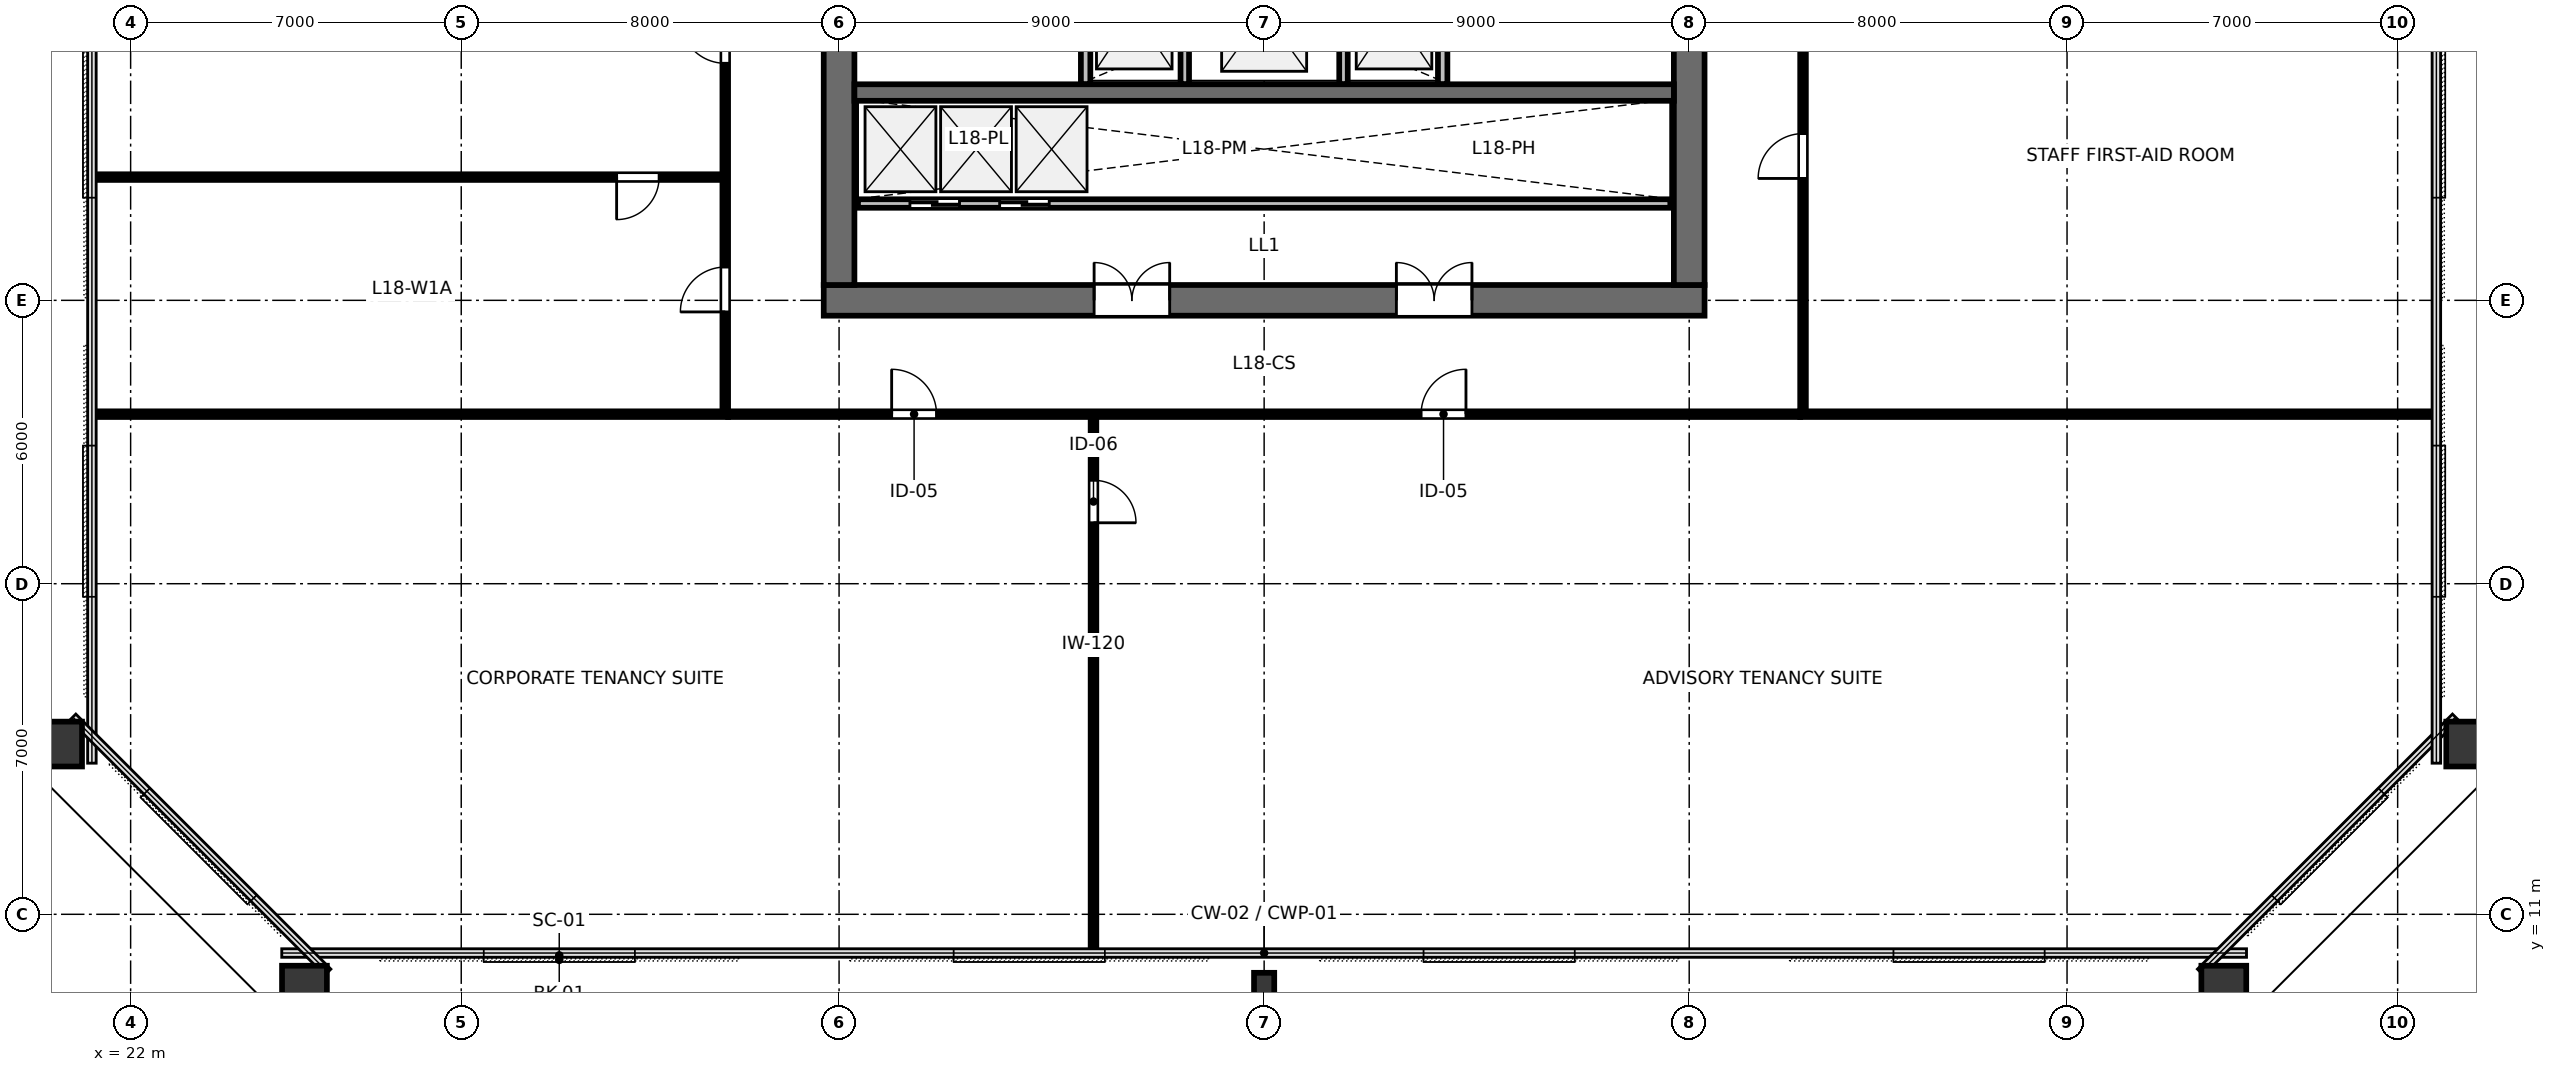
"""IFC4 building model, lengths in metres.
Left out: names, types, materials, properties, quantities, classifications, styles, units other than length and angle.
Written with IfcOpenShell. Run it as: python <this file> out.ifc"""

import sys

from ifc_helpers import new_model, si_unit, direction, frame, frame_2d, origin, origin_2d, place, context, subcontext, project, spatial, rectangle, hollow_rectangle, i_section, extrude, element, fill, save


model = new_model("IFC4")
c1 = context("Model", 3, precision=1e-05, world=origin(), true_north=direction((0.0, 1.0)))
c2 = subcontext(c1, "Body", "Model", "MODEL_VIEW")
j1 = project(units=[si_unit("LENGTHUNIT", "METRE"), si_unit("PLANEANGLEUNIT", "RADIAN")], contexts=[c1])
p1 = place(None, origin())
s1 = spatial("IfcSite", under=j1, at=p1, CompositionType="ELEMENT")
p2 = place(p1, origin())
s2 = spatial("IfcBuilding", under=s1, at=p2, CompositionType="ELEMENT")
p3 = place(p2, frame((0.0, 0.0, 71.2)))
s3 = spatial("IfcBuildingStorey", under=s2, at=p3, CompositionType="ELEMENT", Elevation=71.2)
p4 = place(p3, frame((36.675, 24.0, 0.0), z_axis=(0.0, 0.0, 1.0), x_axis=(1.0, 0.0, 0.0)))
e1 = element("IfcWall", 1, at=p4, inside=s3, PredefinedType="SHEAR", context=c2, shape_type="SweptSolid", body=[
    extrude(rectangle(XDim=18.65, YDim=0.65, at=frame_2d((9.325, 0.0))), origin(), (0.0, 0.0, 1.0), 3.36),
])
p5 = place(p4, frame((5.725, 0.0, 0.0)))
e2 = element("IfcOpeningElement", 2, at=p5, cuts=e1, PredefinedType="OPENING", context=c2, shape_type="SweptSolid", body=[
    extrude(rectangle(XDim=1.6, YDim=2.15, at=frame_2d((0.8, 1.075))), frame((0.0, 0.335, 0.0), z_axis=(0.0, -1.0, 0.0), x_axis=(1.0, 0.0, 0.0)), (0.0, 0.0, 1.0), 0.67),
])
p6 = place(p4, frame((12.125, 0.0, 0.0)))
e3 = element("IfcOpeningElement", 3, at=p6, cuts=e1, PredefinedType="OPENING", context=c2, shape_type="SweptSolid", body=[
    extrude(rectangle(XDim=1.6, YDim=2.15, at=frame_2d((0.8, 1.075))), frame((0.0, 0.335, 0.0), z_axis=(0.0, -1.0, 0.0), x_axis=(1.0, 0.0, 0.0)), (0.0, 0.0, 1.0), 0.67),
])
p7 = place(p3, frame((37.0, 24.325, 0.0), z_axis=(0.0, 0.0, 1.0), x_axis=(0.0, 1.0, 0.0)))
e4 = element("IfcWall", 4, at=p7, inside=s3, PredefinedType="SHEAR", context=c2, shape_type="SweptSolid", body=[
    extrude(rectangle(XDim=15.35, YDim=0.65, at=frame_2d((7.675, 0.0))), origin(), (0.0, 0.0, 1.0), 3.36),
])
p8 = place(p7, frame((5.2, 0.0, 0.0)))
e5 = element("IfcOpeningElement", 5, at=p8, cuts=e4, PredefinedType="OPENING", context=c2, shape_type="SweptSolid", body=[
    extrude(rectangle(XDim=1.15, YDim=2.15, at=frame_2d((0.575, 1.075))), frame((0.0, 0.335, 0.0), z_axis=(0.0, -1.0, 0.0), x_axis=(1.0, 0.0, 0.0)), (0.0, 0.0, 1.0), 0.67),
])
p9 = place(p3, frame((55.0, 24.325, 0.0), z_axis=(0.0, 0.0, 1.0), x_axis=(0.0, 1.0, 0.0)))
e6 = element("IfcWall", 6, at=p9, inside=s3, PredefinedType="SHEAR", context=c2, shape_type="SweptSolid", body=[
    extrude(rectangle(XDim=15.35, YDim=0.65, at=frame_2d((7.675, 0.0))), origin(), (0.0, 0.0, 1.0), 3.36),
])
p10 = place(p9, frame((5.2, 0.0, 0.0)))
e7 = element("IfcOpeningElement", 7, at=p10, cuts=e6, PredefinedType="OPENING", context=c2, shape_type="SweptSolid", body=[
    extrude(rectangle(XDim=1.15, YDim=2.15, at=frame_2d((0.575, 1.075))), frame((0.0, 0.335, 0.0), z_axis=(0.0, -1.0, 0.0), x_axis=(1.0, 0.0, 0.0)), (0.0, 0.0, 1.0), 0.67),
])
p11 = place(p3, frame((37.325, 28.4, 0.0), z_axis=(0.0, 0.0, 1.0), x_axis=(1.0, 0.0, 0.0)))
e8 = element("IfcWall", 8, at=p11, inside=s3, PredefinedType="SHEAR", context=c2, shape_type="SweptSolid", body=[
    extrude(rectangle(XDim=17.35, YDim=0.35, at=frame_2d((8.675, 0.0))), origin(), (0.0, 0.0, 1.0), 3.36),
])
p12 = place(p3, frame((25.681, 9.336, 0.0), z_axis=(0.0, 0.0, 1.0), x_axis=(1.0, 0.0, 0.0)))
e9 = element("IfcColumn", 9, at=p12, inside=s3, PredefinedType="COLUMN", context=c2, shape_type="SweptSolid", body=[
    extrude(hollow_rectangle(XDim=0.95, YDim=1.15, WallThickness=0.06, at=origin_2d()), origin(), (0.0, 0.0, 1.0), 3.358),
])
p13 = place(p3, frame((46.0, 9.52, 0.0), z_axis=(0.0, 0.0, 1.0), x_axis=(1.0, 0.0, 0.0)))
e10 = element("IfcColumn", 10, at=p13, inside=s3, PredefinedType="COLUMN", context=c2, shape_type="SweptSolid", body=[
    extrude(i_section(OverallWidth=0.428, OverallDepth=0.483, WebThickness=0.051, FlangeThickness=0.082, FilletRadius=0.025, at=origin_2d()), origin(), (0.0, 0.0, 1.0), 3.358),
])
for number, where, z_axis, x_axis in (
    (11, (66.319, 9.336, 0.0), (0.0, 0.0, 1.0), (1.0, 0.0, 0.0)),
    (12, (71.604, 14.604, 0.0), (0.0, 0.0, 1.0), (0.0, 1.0, 0.0)),
    (13, (20.396, 14.604, 0.0), (0.0, 0.0, 1.0), (0.0, 1.0, 0.0)),
):
    element("IfcColumn", number, at=place(p3, frame(where, z_axis=z_axis, x_axis=x_axis)), inside=s3, PredefinedType="COLUMN", context=c2, shape_type="SweptSolid", body=[
        extrude(hollow_rectangle(XDim=0.95, YDim=1.15, WallThickness=0.06, at=origin_2d()), origin(), (0.0, 0.0, 1.0), 3.358),
    ])
p14 = place(p3, frame((42.22, 28.58, 0.0), z_axis=(0.0, 0.0, 1.0), x_axis=(0.0, 1.0, 0.0)))
e14 = element("IfcWall", 14, at=p14, inside=s3, PredefinedType="PARTITIONING", context=c2, shape_type="SweptSolid", body=[
    extrude(rectangle(XDim=3.04, YDim=0.2, at=frame_2d((1.52, 0.0))), origin(), (0.0, 0.0, 1.0), 3.36),
])
p15 = place(p14, frame((0.95, 0.0, 0.0)))
e15 = element("IfcOpeningElement", 15, at=p15, cuts=e14, PredefinedType="OPENING", context=c2, shape_type="SweptSolid", body=[
    extrude(rectangle(XDim=1.05, YDim=2.15, at=frame_2d((0.525, 1.075))), frame((0.0, 0.11, 0.0), z_axis=(0.0, -1.0, 0.0), x_axis=(1.0, 0.0, 0.0)), (0.0, 0.0, 1.0), 0.22),
])
p16 = place(p3, frame((49.78, 28.58, 0.0), z_axis=(0.0, 0.0, 1.0), x_axis=(0.0, 1.0, 0.0)))
e16 = element("IfcWall", 16, at=p16, inside=s3, PredefinedType="PARTITIONING", context=c2, shape_type="SweptSolid", body=[
    extrude(rectangle(XDim=3.04, YDim=0.2, at=frame_2d((1.52, 0.0))), origin(), (0.0, 0.0, 1.0), 3.36),
])
p17 = place(p16, frame((0.95, 0.0, 0.0)))
e17 = element("IfcOpeningElement", 17, at=p17, cuts=e16, PredefinedType="OPENING", context=c2, shape_type="SweptSolid", body=[
    extrude(rectangle(XDim=1.05, YDim=2.15, at=frame_2d((0.525, 1.075))), frame((0.0, 0.11, 0.0), z_axis=(0.0, -1.0, 0.0), x_axis=(1.0, 0.0, 0.0)), (0.0, 0.0, 1.0), 0.22),
])
for number, where, z_axis, x_axis in (
    (18, (44.32, 28.58, 0.0), (0.0, 0.0, 1.0), (0.0, 1.0, 0.0)),
    (19, (47.68, 28.58, 0.0), (0.0, 0.0, 1.0), (0.0, 1.0, 0.0)),
):
    element("IfcWall", number, at=place(p3, frame(where, z_axis=z_axis, x_axis=x_axis)), inside=s3, PredefinedType="PARTITIONING", context=c2, shape_type="SweptSolid", body=[
        extrude(rectangle(XDim=3.04, YDim=0.18, at=frame_2d((1.52, 0.0))), origin(), (0.0, 0.0, 1.0), 3.36),
    ])
p18 = place(p3, frame((37.4, 26.05, 0.0), z_axis=(0.0, 0.0, 1.0), x_axis=(1.0, 0.0, 0.0)))
e20 = element("IfcWall", 20, at=p18, inside=s3, PredefinedType="PARTITIONING", context=c2, shape_type="SweptSolid", body=[
    extrude(rectangle(XDim=17.2, YDim=0.18, at=frame_2d((8.6, 0.0))), origin(), (0.0, 0.0, 1.0), 3.36),
])
p19 = place(p18, frame((1.1, 0.0, 0.0)))
e21 = element("IfcOpeningElement", 21, at=p19, cuts=e20, PredefinedType="OPENING", context=c2, shape_type="SweptSolid", body=[
    extrude(rectangle(XDim=1.05, YDim=2.15, at=frame_2d((0.525, 1.075))), frame((0.0, 0.1, 0.0), z_axis=(0.0, -1.0, 0.0), x_axis=(1.0, 0.0, 0.0)), (0.0, 0.0, 1.0), 0.2),
])
p20 = place(p18, frame((3.0, 0.0, 0.0)))
e22 = element("IfcOpeningElement", 22, at=p20, cuts=e20, PredefinedType="OPENING", context=c2, shape_type="SweptSolid", body=[
    extrude(rectangle(XDim=1.05, YDim=2.15, at=frame_2d((0.525, 1.075))), frame((0.0, 0.1, 0.0), z_axis=(0.0, -1.0, 0.0), x_axis=(1.0, 0.0, 0.0)), (0.0, 0.0, 1.0), 0.2),
])
p21 = place(p3, frame((42.387, 21.59, 0.0), z_axis=(0.0, 0.0, 1.0), x_axis=(0.0, -1.0, 0.0)))
e23 = element("IfcWall", 23, at=p21, inside=s3, PredefinedType="PARTITIONING", context=c2, shape_type="SweptSolid", body=[
    extrude(rectangle(XDim=11.41, YDim=0.12, at=frame_2d((5.705, 0.0))), origin(), (0.0, 0.0, 1.0), 2.64),
])
p22 = place(p21, frame((1.4, 0.0, 0.0)))
e24 = element("IfcOpeningElement", 24, at=p22, cuts=e23, PredefinedType="OPENING", context=c2, shape_type="SweptSolid", body=[
    extrude(rectangle(XDim=0.9, YDim=2.15, at=frame_2d((0.45, 1.075))), frame((0.0, 0.07, 0.0), z_axis=(0.0, -1.0, 0.0), x_axis=(1.0, 0.0, 0.0)), (0.0, 0.0, 1.0), 0.14),
])
p23 = place(p3, frame((34.65, 21.59, 0.0), z_axis=(0.0, 0.0, 1.0), x_axis=(1.0, 0.0, 0.0)))
e25 = element("IfcWall", 25, at=p23, inside=s3, PredefinedType="PARTITIONING", context=c2, shape_type="SweptSolid", body=[
    extrude(rectangle(XDim=22.7, YDim=0.12, at=frame_2d((11.35, 0.0))), origin(), (0.0, 0.0, 1.0), 2.64),
])
p24 = place(p23, frame((3.463, 0.0, 0.0)))
e26 = element("IfcOpeningElement", 26, at=p24, cuts=e25, PredefinedType="OPENING", context=c2, shape_type="SweptSolid", body=[
    extrude(rectangle(XDim=0.95, YDim=2.15, at=frame_2d((0.475, 1.075))), frame((0.0, 0.07, 0.0), z_axis=(0.0, -1.0, 0.0), x_axis=(1.0, 0.0, 0.0)), (0.0, 0.0, 1.0), 0.14),
])
p25 = place(p23, frame((14.673, 0.0, 0.0)))
e27 = element("IfcOpeningElement", 27, at=p25, cuts=e25, PredefinedType="OPENING", context=c2, shape_type="SweptSolid", body=[
    extrude(rectangle(XDim=0.95, YDim=2.15, at=frame_2d((0.475, 1.075))), frame((0.0, 0.07, 0.0), z_axis=(0.0, -1.0, 0.0), x_axis=(1.0, 0.0, 0.0)), (0.0, 0.0, 1.0), 0.14),
])
p26 = place(p3, frame((34.59, 26.61, 0.0), z_axis=(0.0, 0.0, 1.0), x_axis=(-1.0, 0.0, 0.0)))
e28 = element("IfcWall", 28, at=p26, inside=s3, PredefinedType="PARTITIONING", context=c2, shape_type="SweptSolid", body=[
    extrude(rectangle(XDim=13.41, YDim=0.12, at=frame_2d((6.705, 0.0))), origin(), (0.0, 0.0, 1.0), 2.64),
])
p27 = place(p26, frame((1.4, 0.0, 0.0)))
e29 = element("IfcOpeningElement", 29, at=p27, cuts=e28, PredefinedType="OPENING", context=c2, shape_type="SweptSolid", body=[
    extrude(rectangle(XDim=0.9, YDim=2.15, at=frame_2d((0.45, 1.075))), frame((0.0, 0.07, 0.0), z_axis=(0.0, -1.0, 0.0), x_axis=(1.0, 0.0, 0.0)), (0.0, 0.0, 1.0), 0.14),
])
p28 = place(p3, frame((34.59, 21.65, 0.0), z_axis=(0.0, 0.0, 1.0), x_axis=(0.0, 1.0, 0.0)))
e30 = element("IfcWall", 30, at=p28, inside=s3, PredefinedType="PARTITIONING", context=c2, shape_type="SweptSolid", body=[
    extrude(rectangle(XDim=20.7, YDim=0.12, at=frame_2d((10.35, 0.0))), origin(), (0.0, 0.0, 1.0), 2.64),
])
p29 = place(p28, frame((2.105, 0.0, 0.0)))
e31 = element("IfcOpeningElement", 31, at=p29, cuts=e30, PredefinedType="OPENING", context=c2, shape_type="SweptSolid", body=[
    extrude(rectangle(XDim=0.95, YDim=2.15, at=frame_2d((0.475, 1.075))), frame((0.0, 0.07, 0.0), z_axis=(0.0, -1.0, 0.0), x_axis=(1.0, 0.0, 0.0)), (0.0, 0.0, 1.0), 0.14),
])
p30 = place(p28, frame((7.369, 0.0, 0.0)))
e32 = element("IfcOpeningElement", 32, at=p30, cuts=e30, PredefinedType="OPENING", context=c2, shape_type="SweptSolid", body=[
    extrude(rectangle(XDim=0.95, YDim=2.15, at=frame_2d((0.475, 1.075))), frame((0.0, 0.07, 0.0), z_axis=(0.0, -1.0, 0.0), x_axis=(1.0, 0.0, 0.0)), (0.0, 0.0, 1.0), 0.14),
])
p31 = place(p28, frame((15.139, 0.0, 0.0)))
e33 = element("IfcOpeningElement", 33, at=p31, cuts=e30, PredefinedType="OPENING", context=c2, shape_type="SweptSolid", body=[
    extrude(rectangle(XDim=0.95, YDim=2.15, at=frame_2d((0.475, 1.075))), frame((0.0, 0.07, 0.0), z_axis=(0.0, -1.0, 0.0), x_axis=(1.0, 0.0, 0.0)), (0.0, 0.0, 1.0), 0.14),
])
p32 = place(p3, frame((57.41, 21.65, 0.0), z_axis=(0.0, 0.0, 1.0), x_axis=(0.0, 1.0, 0.0)))
e34 = element("IfcWall", 34, at=p32, inside=s3, PredefinedType="PARTITIONING", context=c2, shape_type="SweptSolid", body=[
    extrude(rectangle(XDim=20.7, YDim=0.12, at=frame_2d((10.35, 0.0))), origin(), (0.0, 0.0, 1.0), 2.64),
])
p33 = place(p32, frame((4.931, 0.0, 0.0)))
e35 = element("IfcOpeningElement", 35, at=p33, cuts=e34, PredefinedType="OPENING", context=c2, shape_type="SweptSolid", body=[
    extrude(rectangle(XDim=0.95, YDim=2.15, at=frame_2d((0.475, 1.075))), frame((0.0, 0.07, 0.0), z_axis=(0.0, -1.0, 0.0), x_axis=(1.0, 0.0, 0.0)), (0.0, 0.0, 1.0), 0.14),
])
p34 = place(p32, frame((15.081, 0.0, 0.0)))
e36 = element("IfcOpeningElement", 36, at=p34, cuts=e34, PredefinedType="OPENING", context=c2, shape_type="SweptSolid", body=[
    extrude(rectangle(XDim=0.95, YDim=2.15, at=frame_2d((0.475, 1.075))), frame((0.0, 0.07, 0.0), z_axis=(0.0, -1.0, 0.0), x_axis=(1.0, 0.0, 0.0)), (0.0, 0.0, 1.0), 0.14),
])
for number, where, z_axis, x_axis in (
    (37, (34.65, 21.59, 0.0), (0.0, 0.0, 1.0), (-1.0, 0.0, 0.0)),
    (38, (57.35, 21.59, 0.0), (0.0, 0.0, 1.0), (1.0, 0.0, 0.0)),
):
    element("IfcWall", number, at=place(p3, frame(where, z_axis=z_axis, x_axis=x_axis)), inside=s3, PredefinedType="PARTITIONING", context=c2, shape_type="SweptSolid", body=[
        extrude(rectangle(XDim=13.47, YDim=0.12, at=frame_2d((6.735, 0.0))), origin(), (0.0, 0.0, 1.0), 2.64),
    ])
p35 = place(p5, origin())
e39 = element("IfcDoor", 39, at=p35, inside=s3, OperationType="DOUBLE_DOOR_SINGLE_SWING", PredefinedType="DOOR", context=c2, shape_type="SweptSolid", body=[
    extrude(rectangle(XDim=1.6, YDim=2.15, at=frame_2d((0.8, 1.075))), frame((0.0, 0.025, 0.0), z_axis=(0.0, -1.0, 0.0), x_axis=(1.0, 0.0, 0.0)), (0.0, 0.0, 1.0), 0.05),
])
fill(e2, e39)
p36 = place(p6, origin())
e40 = element("IfcDoor", 40, at=p36, inside=s3, OperationType="DOUBLE_DOOR_SINGLE_SWING", PredefinedType="DOOR", context=c2, shape_type="SweptSolid", body=[
    extrude(rectangle(XDim=1.6, YDim=2.15, at=frame_2d((0.8, 1.075))), frame((0.0, 0.025, 0.0), z_axis=(0.0, -1.0, 0.0), x_axis=(1.0, 0.0, 0.0)), (0.0, 0.0, 1.0), 0.05),
])
fill(e3, e40)
p37 = place(p19, origin())
e41 = element("IfcDoor", 41, at=p37, inside=s3, OperationType="SLIDING_TO_LEFT", PredefinedType="DOOR", context=c2, shape_type="SweptSolid", body=[
    extrude(rectangle(XDim=1.05, YDim=2.15, at=frame_2d((0.525, 1.075))), frame((0.0, 0.025, 0.0), z_axis=(0.0, -1.0, 0.0), x_axis=(1.0, 0.0, 0.0)), (0.0, 0.0, 1.0), 0.05),
])
fill(e21, e41)
p38 = place(p20, origin())
e42 = element("IfcDoor", 42, at=p38, inside=s3, OperationType="SLIDING_TO_RIGHT", PredefinedType="DOOR", context=c2, shape_type="SweptSolid", body=[
    extrude(rectangle(XDim=1.05, YDim=2.15, at=frame_2d((0.525, 1.075))), frame((0.0, 0.025, 0.0), z_axis=(0.0, -1.0, 0.0), x_axis=(1.0, 0.0, 0.0)), (0.0, 0.0, 1.0), 0.05),
])
fill(e22, e42)
p39 = place(p22, origin())
e43 = element("IfcDoor", 43, at=p39, inside=s3, OperationType="SINGLE_SWING_RIGHT", PredefinedType="DOOR", context=c2, shape_type="SweptSolid", body=[
    extrude(rectangle(XDim=0.9, YDim=2.15, at=frame_2d((0.45, 1.075))), frame((0.0, 0.025, 0.0), z_axis=(0.0, -1.0, 0.0), x_axis=(1.0, 0.0, 0.0)), (0.0, 0.0, 1.0), 0.05),
])
fill(e24, e43)
p40 = place(p24, origin())
e44 = element("IfcDoor", 44, at=p40, inside=s3, OperationType="SINGLE_SWING_LEFT", PredefinedType="DOOR", context=c2, shape_type="SweptSolid", body=[
    extrude(rectangle(XDim=0.95, YDim=2.15, at=frame_2d((0.475, 1.075))), frame((0.0, 0.025, 0.0), z_axis=(0.0, -1.0, 0.0), x_axis=(1.0, 0.0, 0.0)), (0.0, 0.0, 1.0), 0.05),
])
fill(e26, e44)
p41 = place(p25, origin())
e45 = element("IfcDoor", 45, at=p41, inside=s3, OperationType="SINGLE_SWING_RIGHT", PredefinedType="DOOR", context=c2, shape_type="SweptSolid", body=[
    extrude(rectangle(XDim=0.95, YDim=2.15, at=frame_2d((0.475, 1.075))), frame((0.0, 0.025, 0.0), z_axis=(0.0, -1.0, 0.0), x_axis=(1.0, 0.0, 0.0)), (0.0, 0.0, 1.0), 0.05),
])
fill(e27, e45)
p42 = place(p27, origin())
e46 = element("IfcDoor", 46, at=p42, inside=s3, OperationType="SINGLE_SWING_RIGHT", PredefinedType="DOOR", context=c2, shape_type="SweptSolid", body=[
    extrude(rectangle(XDim=0.9, YDim=2.15, at=frame_2d((0.45, 1.075))), frame((0.0, 0.025, 0.0), z_axis=(0.0, -1.0, 0.0), x_axis=(1.0, 0.0, 0.0)), (0.0, 0.0, 1.0), 0.05),
])
fill(e29, e46)
p43 = place(p29, origin())
e47 = element("IfcDoor", 47, at=p43, inside=s3, OperationType="SINGLE_SWING_LEFT", PredefinedType="DOOR", context=c2, shape_type="SweptSolid", body=[
    extrude(rectangle(XDim=0.95, YDim=2.15, at=frame_2d((0.475, 1.075))), frame((0.0, 0.025, 0.0), z_axis=(0.0, -1.0, 0.0), x_axis=(1.0, 0.0, 0.0)), (0.0, 0.0, 1.0), 0.05),
])
fill(e31, e47)
p44 = place(p30, origin())
e48 = element("IfcDoor", 48, at=p44, inside=s3, OperationType="SINGLE_SWING_RIGHT", PredefinedType="DOOR", context=c2, shape_type="SweptSolid", body=[
    extrude(rectangle(XDim=0.95, YDim=2.15, at=frame_2d((0.475, 1.075))), frame((0.0, 0.025, 0.0), z_axis=(0.0, -1.0, 0.0), x_axis=(1.0, 0.0, 0.0)), (0.0, 0.0, 1.0), 0.05),
])
fill(e32, e48)
p45 = place(p33, origin())
e49 = element("IfcDoor", 49, at=p45, inside=s3, OperationType="SINGLE_SWING_LEFT", PredefinedType="DOOR", context=c2, shape_type="SweptSolid", body=[
    extrude(rectangle(XDim=0.95, YDim=2.15, at=frame_2d((0.475, 1.075))), frame((0.0, 0.025, 0.0), z_axis=(0.0, -1.0, 0.0), x_axis=(1.0, 0.0, 0.0)), (0.0, 0.0, 1.0), 0.05),
])
fill(e35, e49)
save(model, sys.argv[1])
